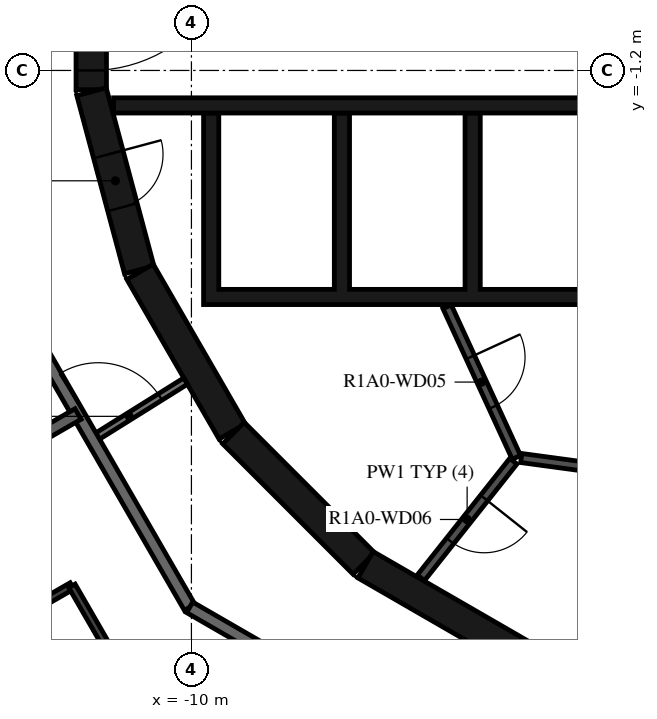
"""IFC4 building model, lengths in metres.
Left out: names, types, materials, properties, quantities, classifications, styles, units other than length and angle.
Written with IfcOpenShell. Run it as: python <this file> out.ifc"""

import sys

from ifc_helpers import new_model, si_unit, direction, frame, frame_2d, origin, place, context, subcontext, project, spatial, polyline, rectangle, outline, extrude, element, fill, save


model = new_model("IFC4")
c1 = context("Model", 3, precision=1e-05, world=origin(), true_north=direction((0.0, 1.0)))
c2 = subcontext(c1, "Body", "Model", "MODEL_VIEW")
j1 = project(units=[si_unit("LENGTHUNIT", "METRE"), si_unit("PLANEANGLEUNIT", "RADIAN")], contexts=[c1])
p1 = place(None, origin())
s1 = spatial("IfcSite", under=j1, at=p1, CompositionType="ELEMENT")
p2 = place(p1, origin())
s2 = spatial("IfcBuilding", under=s1, at=p2, CompositionType="ELEMENT")
p3 = place(p2, frame((0.0, 0.0, 38.4)))
s3 = spatial("IfcBuildingStorey", under=s2, at=p3, CompositionType="ELEMENT", Elevation=38.4)
p4 = place(p3, frame((-11.647, 1.516, 0.0), z_axis=(0.0, 0.0, 1.0), x_axis=(0.0, -1.0, 0.0)))
e1 = element("IfcWall", 1, at=p4, inside=s3, PredefinedType="SHEAR", context=c2, shape_type="SweptSolid", body=[
    extrude(rectangle(XDim=3.033, YDim=0.5, at=frame_2d((1.516, 0.0))), origin(), (0.0, 0.0, 1.0), 3.12),
])
p5 = place(p4, frame((0.316, 0.0, 0.0)))
e2 = element("IfcOpeningElement", 2, at=p5, cuts=e1, PredefinedType="OPENING", context=c2, shape_type="SweptSolid", body=[
    extrude(rectangle(XDim=2.4, YDim=2.1, at=frame_2d((1.2, 1.05))), frame((0.0, 0.26, 0.0), z_axis=(0.0, -1.0, 0.0), x_axis=(1.0, 0.0, 0.0)), (0.0, 0.0, 1.0), 0.52),
])
p6 = place(p3, frame((-11.643, -1.55, 0.0), z_axis=(0.0, 0.0, 1.0), x_axis=(0.258734743916, -0.965948410781, 0.0)))
e3 = element("IfcWall", 3, at=p6, inside=s3, PredefinedType="SHEAR", context=c2, shape_type="SweptSolid", body=[
    extrude(rectangle(XDim=3.033, YDim=0.5, at=frame_2d((1.516, 0.0))), origin(), (0.0, 0.0, 1.0), 3.12),
])
p7 = place(p6, frame((1.066, 0.0, 0.0)))
e4 = element("IfcOpeningElement", 4, at=p7, cuts=e3, PredefinedType="OPENING", context=c2, shape_type="SweptSolid", body=[
    extrude(rectangle(XDim=0.9, YDim=2.1, at=frame_2d((0.45, 1.05))), frame((0.0, 0.26, 0.0), z_axis=(0.0, -1.0, 0.0), x_axis=(1.0, 0.0, 0.0)), (0.0, 0.0, 1.0), 0.52),
])
p8 = place(p3, frame((-10.845, -4.51, 0.0), z_axis=(0.0, 0.0, 1.0), x_axis=(0.500087131594, -0.865975092491, 0.0)))
e5 = element("IfcWall", 5, at=p8, inside=s3, PredefinedType="SHEAR", context=c2, shape_type="SweptSolid", body=[
    extrude(rectangle(XDim=3.033, YDim=0.5, at=frame_2d((1.516, 0.0))), origin(), (0.0, 0.0, 1.0), 3.12),
])
p9 = place(p3, frame((-9.308, -7.164, 0.0), z_axis=(0.0, 0.0, 1.0), x_axis=(0.707106781187, -0.707106781187, 0.0)))
e6 = element("IfcWall", 6, at=p9, inside=s3, PredefinedType="SHEAR", context=c2, shape_type="SweptSolid", body=[
    extrude(rectangle(XDim=3.032, YDim=0.5, at=frame_2d((1.516, 0.0))), origin(), (0.0, 0.0, 1.0), 3.12),
])
p10 = place(p3, frame((-7.137, -9.329, 0.0), z_axis=(0.0, 0.0, 1.0), x_axis=(0.865975092491, -0.500087131594, 0.0)))
e7 = element("IfcWall", 7, at=p10, inside=s3, PredefinedType="SHEAR", context=c2, shape_type="SweptSolid", body=[
    extrude(rectangle(XDim=3.033, YDim=0.5, at=frame_2d((1.516, 0.0))), origin(), (0.0, 0.0, 1.0), 3.12),
])
p11 = place(p3, origin())
e8 = element("IfcWall", 8, at=p11, inside=s3, PredefinedType="SHEAR", context=c2, shape_type="SweptSolid", body=[
    extrude(outline(polyline([(9.8, -5.05), (9.8, -4.8), (9.8, -1.9), (9.55, -1.9), (9.55, -4.8), (7.65, -4.8), (7.65, -1.9), (7.4, -1.9), (7.4, -4.8), (5.5, -4.8), (5.5, -1.9), (5.25, -1.9), (5.25, -4.8), (3.35, -4.8), (3.35, -1.9), (3.1, -1.9), (3.1, -4.8), (-5.25, -4.8), (-5.25, -1.9), (-5.5, -1.9), (-5.5, -4.8), (-7.4, -4.8), (-7.4, -1.9), (-7.65, -1.9), (-7.65, -4.8), (-9.55, -4.8), (-9.55, -1.9), (-9.8, -1.9), (-9.8, -4.8), (-9.8, -5.05), (9.8, -5.05)])), origin(), (0.0, 0.0, 1.0), 3.12),
])
p12 = place(p3, frame((-11.28, -1.775, 0.0), z_axis=(0.0, 0.0, 1.0), x_axis=(1.0, 0.0, 0.0)))
e9 = element("IfcWall", 9, at=p12, inside=s3, PredefinedType="SHEAR", context=c2, shape_type="SweptSolid", body=[
    extrude(rectangle(XDim=14.38, YDim=0.25, at=frame_2d((7.19, 0.0))), origin(), (0.0, 0.0, 1.0), 3.12),
])
p13 = place(p12, frame((9.755, 0.0, 0.0)))
e10 = element("IfcOpeningElement", 10, at=p13, cuts=e9, PredefinedType="OPENING", context=c2, shape_type="SweptSolid", body=[
    extrude(rectangle(XDim=0.9, YDim=2.1, at=frame_2d((0.45, 1.05))), frame((0.0, 0.135, 0.0), z_axis=(0.0, -1.0, 0.0), x_axis=(1.0, 0.0, 0.0)), (0.0, 0.0, 1.0), 0.27),
])
p14 = place(p3, frame((-5.795, -5.086, 0.0), z_axis=(0.0, 0.0, 1.0), x_axis=(0.417887867606, -0.908498613157, 0.0)))
e11 = element("IfcWall", 11, at=p14, inside=s3, PredefinedType="PARTITIONING", context=c2, shape_type="SweptSolid", body=[
    extrude(rectangle(XDim=2.726, YDim=0.15, at=frame_2d((1.363, 0.0))), origin(), (0.0, 0.0, 1.0), 3.12),
])
p15 = place(p14, frame((0.913, 0.0, 0.0)))
e12 = element("IfcOpeningElement", 12, at=p15, cuts=e11, PredefinedType="OPENING", context=c2, shape_type="SweptSolid", body=[
    extrude(rectangle(XDim=0.9, YDim=2.1, at=frame_2d((0.45, 1.05))), frame((0.0, 0.085, 0.0), z_axis=(0.0, -1.0, 0.0), x_axis=(1.0, 0.0, 0.0)), (0.0, 0.0, 1.0), 0.17),
])
p16 = place(p3, frame((-4.706, -7.625, 0.0), z_axis=(0.0, 0.0, 1.0), x_axis=(-0.621392599334, -0.783499353856, 0.0)))
e13 = element("IfcWall", 13, at=p16, inside=s3, PredefinedType="PARTITIONING", context=c2, shape_type="SweptSolid", body=[
    extrude(rectangle(XDim=2.447, YDim=0.15, at=frame_2d((1.224, 0.0))), origin(), (0.0, 0.0, 1.0), 3.12),
])
p17 = place(p16, frame((0.774, 0.0, 0.0)))
e14 = element("IfcOpeningElement", 14, at=p17, cuts=e13, PredefinedType="OPENING", context=c2, shape_type="SweptSolid", body=[
    extrude(rectangle(XDim=0.9, YDim=2.1, at=frame_2d((0.45, 1.05))), frame((0.0, 0.085, 0.0), z_axis=(0.0, -1.0, 0.0), x_axis=(1.0, 0.0, 0.0)), (0.0, 0.0, 1.0), 0.17),
])
p18 = place(p3, frame((-2.42, -7.865, 0.0), z_axis=(0.0, 0.0, 1.0), x_axis=(-0.990972299108, 0.134066783362, 0.0)))
e15 = element("IfcWall", 15, at=p18, inside=s3, PredefinedType="PARTITIONING", context=c2, shape_type="SweptSolid", body=[
    extrude(rectangle(XDim=2.176, YDim=0.15, at=frame_2d((1.088, 0.0))), origin(), (0.0, 0.0, 1.0), 3.12),
])
p19 = place(p3, frame((-11.625, -7.264, 0.0), z_axis=(0.0, 0.0, 1.0), x_axis=(0.84803632456, 0.529938102259, 0.0)))
e16 = element("IfcWall", 16, at=p19, inside=s3, PredefinedType="PARTITIONING", context=c2, shape_type="SweptSolid", body=[
    extrude(rectangle(XDim=1.804, YDim=0.12, at=frame_2d((0.902, 0.0))), origin(), (0.0, 0.0, 1.0), 3.12),
])
p20 = place(p19, frame((0.11, 0.0, 0.0)))
e17 = element("IfcOpeningElement", 17, at=p20, cuts=e16, PredefinedType="OPENING", context=c2, shape_type="SweptSolid", body=[
    extrude(rectangle(XDim=1.2, YDim=2.1, at=frame_2d((0.6, 1.05))), frame((0.0, 0.07, 0.0), z_axis=(0.0, -1.0, 0.0), x_axis=(1.0, 0.0, 0.0)), (0.0, 0.0, 1.0), 0.14),
])
p21 = place(p3, frame((-13.7, -3.671, 0.0), z_axis=(0.0, 0.0, 1.0), x_axis=(0.500001669485, -0.866024439905, 0.0)))
e18 = element("IfcWall", 18, at=p21, inside=s3, PredefinedType="STANDARD", context=c2, shape_type="SweptSolid", body=[
    extrude(rectangle(XDim=7.342, YDim=0.2, at=frame_2d((3.671, 0.0))), origin(), (0.0, 0.0, 1.0), 3.12),
])
p22 = place(p3, frame((-10.029, -10.029, 0.0), z_axis=(0.0, 0.0, 1.0), x_axis=(0.866022878987, -0.500004373052, 0.0)))
e19 = element("IfcWall", 19, at=p22, inside=s3, PredefinedType="STANDARD", context=c2, shape_type="SweptSolid", body=[
    extrude(rectangle(XDim=7.146, YDim=0.2, at=frame_2d((3.573, 0.0))), origin(), (0.0, 0.0, 1.0), 3.12),
])
p23 = place(p22, frame((5.947, 0.0, 0.0)))
e20 = element("IfcOpeningElement", 20, at=p23, cuts=e19, PredefinedType="OPENING", context=c2, shape_type="SweptSolid", body=[
    extrude(rectangle(XDim=1.0, YDim=2.1, at=frame_2d((0.5, 1.05))), frame((0.0, 0.11, 0.0), z_axis=(0.0, -1.0, 0.0), x_axis=(1.0, 0.0, 0.0)), (0.0, 0.0, 1.0), 0.22),
])
p24 = place(p3, frame((-18.694, -10.793, 0.0), z_axis=(0.0, 0.0, 1.0), x_axis=(0.86603400694, 0.499985098601, 0.0)))
e21 = element("IfcWall", 21, at=p24, inside=s3, PredefinedType="STANDARD", context=c2, shape_type="SweptSolid", body=[
    extrude(rectangle(XDim=7.885, YDim=0.2, at=frame_2d((3.943, 0.0))), origin(), (0.0, 0.0, 1.0), 3.12),
])
p25 = place(p3, frame((-17.099, -12.641, 0.0), z_axis=(0.0, 0.0, 1.0), x_axis=(0.866027165828, 0.499996948039, 0.0)))
e22 = element("IfcWall", 22, at=p25, inside=s3, PredefinedType="PARTITIONING", context=c2, shape_type="SweptSolid", body=[
    extrude(rectangle(XDim=5.928, YDim=0.12, at=frame_2d((2.964, 0.0))), origin(), (0.0, 0.0, 1.0), 3.12),
])
p26 = place(p25, frame((0.595, 0.0, 0.0)))
e23 = element("IfcOpeningElement", 23, at=p26, cuts=e22, PredefinedType="OPENING", context=c2, shape_type="SweptSolid", body=[
    extrude(rectangle(XDim=0.9, YDim=2.1, at=frame_2d((0.45, 1.05))), frame((0.0, 0.07, 0.0), z_axis=(0.0, -1.0, 0.0), x_axis=(1.0, 0.0, 0.0)), (0.0, 0.0, 1.0), 0.14),
])
p27 = place(p3, frame((-11.965, -9.677, 0.0), z_axis=(0.0, 0.0, 1.0), x_axis=(0.499932737185, -0.866064234506, 0.0)))
e24 = element("IfcWall", 24, at=p27, inside=s3, PredefinedType="PARTITIONING", context=c2, shape_type="SweptSolid", body=[
    extrude(rectangle(XDim=1.675, YDim=0.12, at=frame_2d((0.837, 0.0))), origin(), (0.0, 0.0, 1.0), 3.12),
])
p28 = place(p5, origin())
e25 = element("IfcDoor", 25, at=p28, inside=s3, OperationType="DOUBLE_DOOR_SINGLE_SWING", PredefinedType="DOOR", context=c2, shape_type="SweptSolid", body=[
    extrude(rectangle(XDim=2.4, YDim=2.1, at=frame_2d((1.2, 1.05))), frame((0.0, 0.025, 0.0), z_axis=(0.0, -1.0, 0.0), x_axis=(1.0, 0.0, 0.0)), (0.0, 0.0, 1.0), 0.05),
])
fill(e2, e25)
p29 = place(p15, origin())
e26 = element("IfcDoor", 26, at=p29, inside=s3, OperationType="SINGLE_SWING_RIGHT", PredefinedType="DOOR", context=c2, shape_type="SweptSolid", body=[
    extrude(rectangle(XDim=0.9, YDim=2.1, at=frame_2d((0.45, 1.05))), frame((0.0, 0.025, 0.0), z_axis=(0.0, -1.0, 0.0), x_axis=(1.0, 0.0, 0.0)), (0.0, 0.0, 1.0), 0.05),
])
fill(e12, e26)
p30 = place(p17, origin())
e27 = element("IfcDoor", 27, at=p30, inside=s3, OperationType="SINGLE_SWING_LEFT", PredefinedType="DOOR", context=c2, shape_type="SweptSolid", body=[
    extrude(rectangle(XDim=0.9, YDim=2.1, at=frame_2d((0.45, 1.05))), frame((0.0, 0.025, 0.0), z_axis=(0.0, -1.0, 0.0), x_axis=(1.0, 0.0, 0.0)), (0.0, 0.0, 1.0), 0.05),
])
fill(e14, e27)
p31 = place(p7, origin())
e28 = element("IfcDoor", 28, at=p31, inside=s3, OperationType="SINGLE_SWING_RIGHT", PredefinedType="DOOR", context=c2, shape_type="SweptSolid", body=[
    extrude(rectangle(XDim=0.9, YDim=2.1, at=frame_2d((0.45, 1.05))), frame((0.0, 0.025, 0.0), z_axis=(0.0, -1.0, 0.0), x_axis=(1.0, 0.0, 0.0)), (0.0, 0.0, 1.0), 0.05),
])
fill(e4, e28)
p32 = place(p20, origin())
e29 = element("IfcDoor", 29, at=p32, inside=s3, OperationType="DOUBLE_DOOR_SINGLE_SWING", PredefinedType="DOOR", context=c2, shape_type="SweptSolid", body=[
    extrude(rectangle(XDim=1.2, YDim=2.1, at=frame_2d((0.6, 1.05))), frame((0.0, 0.025, 0.0), z_axis=(0.0, -1.0, 0.0), x_axis=(1.0, 0.0, 0.0)), (0.0, 0.0, 1.0), 0.05),
])
fill(e17, e29)
save(model, sys.argv[1])
